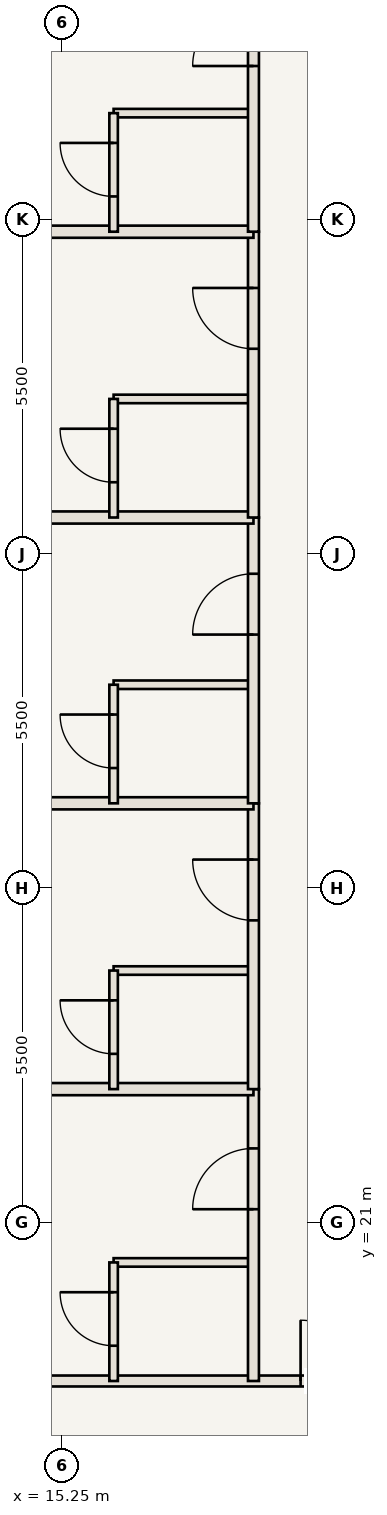
"""IFC4 building model, lengths in metres.
Left out: names, types, materials, properties, quantities, classifications, styles, units other than length and angle.
Written with IfcOpenShell. Run it as: python <this file> out.ifc"""

import sys

from ifc_helpers import new_model, si_unit, direction, frame, frame_2d, origin, place, context, subcontext, project, spatial, rectangle, extrude, element, fill, save


model = new_model("IFC4")
c1 = context("Model", 3, precision=1e-05, world=origin(), true_north=direction((0.0, 1.0)))
c2 = subcontext(c1, "Body", "Model", "MODEL_VIEW")
j1 = project(units=[si_unit("LENGTHUNIT", "METRE"), si_unit("PLANEANGLEUNIT", "RADIAN")], contexts=[c1])
p1 = place(None, origin())
s1 = spatial("IfcSite", under=j1, at=p1, CompositionType="ELEMENT")
p2 = place(p1, origin())
s2 = spatial("IfcBuilding", under=s1, at=p2, CompositionType="ELEMENT")
p3 = place(p2, frame((0.0, 0.0, 42.35)))
s3 = spatial("IfcBuildingStorey", under=s2, at=p3, CompositionType="ELEMENT", Elevation=42.35)
p4 = place(p3, frame((7.5, 18.4, 0.0), z_axis=(0.0, 0.0, 1.0), x_axis=(1.0, 0.0, 0.0)))
e1 = element("IfcWall", 1, at=p4, inside=s3, PredefinedType="STANDARD", context=c2, shape_type="SweptSolid", body=[
    extrude(rectangle(XDim=16.3, YDim=0.18, at=frame_2d((8.15, 0.0))), origin(), (0.0, 0.0, 1.0), 3.32),
])
p5 = place(p4, frame((11.675, 0.0, 0.0)))
e2 = element("IfcOpeningElement", 2, at=p5, cuts=e1, PredefinedType="OPENING", context=c2, shape_type="SweptSolid", body=[
    extrude(rectangle(XDim=1.0, YDim=2.15, at=frame_2d((0.5, 1.075))), frame((0.0, 0.1, 0.0), z_axis=(0.0, -1.0, 0.0), x_axis=(1.0, 0.0, 0.0)), (0.0, 0.0, 1.0), 0.2),
])
p6 = place(p3, frame((16.1, 20.35, 0.0), z_axis=(0.0, 0.0, 1.0), x_axis=(1.0, 0.0, 0.0)))
e3 = element("IfcWall", 3, at=p6, inside=s3, PredefinedType="STANDARD", context=c2, shape_type="SweptSolid", body=[
    extrude(rectangle(XDim=2.3, YDim=0.14, at=frame_2d((1.15, 0.0))), origin(), (0.0, 0.0, 1.0), 3.32),
])
p7 = place(p3, frame((16.1, 18.4, 0.0), z_axis=(0.0, 0.0, 1.0), x_axis=(0.0, 1.0, 0.0)))
e4 = element("IfcWall", 4, at=p7, inside=s3, PredefinedType="STANDARD", context=c2, shape_type="SweptSolid", body=[
    extrude(rectangle(XDim=1.95, YDim=0.14, at=frame_2d((0.975, 0.0))), origin(), (0.0, 0.0, 1.0), 3.32),
])
p8 = place(p7, frame((0.58, 0.0, 0.0)))
e5 = element("IfcOpeningElement", 5, at=p8, cuts=e4, PredefinedType="OPENING", context=c2, shape_type="SweptSolid", body=[
    extrude(rectangle(XDim=0.88, YDim=2.1, at=frame_2d((0.44, 1.05))), frame((0.0, 0.08, 0.0), z_axis=(0.0, -1.0, 0.0), x_axis=(1.0, 0.0, 0.0)), (0.0, 0.0, 1.0), 0.16),
])
p9 = place(p3, frame((18.4, 18.4, 0.0), z_axis=(0.0, 0.0, 1.0), x_axis=(0.0, 1.0, 0.0)))
e6 = element("IfcWall", 6, at=p9, inside=s3, PredefinedType="STANDARD", context=c2, shape_type="SweptSolid", body=[
    extrude(rectangle(XDim=4.8, YDim=0.18, at=frame_2d((2.4, 0.0))), origin(), (0.0, 0.0, 1.0), 3.32),
])
p10 = place(p9, frame((2.825, 0.0, 0.0)))
e7 = element("IfcOpeningElement", 7, at=p10, cuts=e6, PredefinedType="OPENING", context=c2, shape_type="SweptSolid", body=[
    extrude(rectangle(XDim=1.0, YDim=2.15, at=frame_2d((0.5, 1.075))), frame((0.0, 0.1, 0.0), z_axis=(0.0, -1.0, 0.0), x_axis=(1.0, 0.0, 0.0)), (0.0, 0.0, 1.0), 0.2),
])
p11 = place(p3, frame((4.06, 23.2, 0.0), z_axis=(0.0, 0.0, 1.0), x_axis=(1.0, 0.0, 0.0)))
e8 = element("IfcWall", 8, at=p11, inside=s3, PredefinedType="STANDARD", context=c2, shape_type="SweptSolid", body=[
    extrude(rectangle(XDim=14.34, YDim=0.2, at=frame_2d((7.17, 0.0))), origin(), (0.0, 0.0, 1.0), 3.32),
])
p12 = place(p3, frame((16.1, 25.15, 0.0), z_axis=(0.0, 0.0, 1.0), x_axis=(1.0, 0.0, 0.0)))
e9 = element("IfcWall", 9, at=p12, inside=s3, PredefinedType="STANDARD", context=c2, shape_type="SweptSolid", body=[
    extrude(rectangle(XDim=2.3, YDim=0.14, at=frame_2d((1.15, 0.0))), origin(), (0.0, 0.0, 1.0), 3.32),
])
p13 = place(p3, frame((16.1, 23.2, 0.0), z_axis=(0.0, 0.0, 1.0), x_axis=(0.0, 1.0, 0.0)))
e10 = element("IfcWall", 10, at=p13, inside=s3, PredefinedType="STANDARD", context=c2, shape_type="SweptSolid", body=[
    extrude(rectangle(XDim=1.95, YDim=0.14, at=frame_2d((0.975, 0.0))), origin(), (0.0, 0.0, 1.0), 3.32),
])
p14 = place(p13, frame((0.58, 0.0, 0.0)))
e11 = element("IfcOpeningElement", 11, at=p14, cuts=e10, PredefinedType="OPENING", context=c2, shape_type="SweptSolid", body=[
    extrude(rectangle(XDim=0.88, YDim=2.1, at=frame_2d((0.44, 1.05))), frame((0.0, 0.08, 0.0), z_axis=(0.0, -1.0, 0.0), x_axis=(1.0, 0.0, 0.0)), (0.0, 0.0, 1.0), 0.16),
])
p15 = place(p3, frame((18.4, 23.2, 0.0), z_axis=(0.0, 0.0, 1.0), x_axis=(0.0, 1.0, 0.0)))
e12 = element("IfcWall", 12, at=p15, inside=s3, PredefinedType="STANDARD", context=c2, shape_type="SweptSolid", body=[
    extrude(rectangle(XDim=4.7, YDim=0.18, at=frame_2d((2.35, 0.0))), origin(), (0.0, 0.0, 1.0), 3.32),
])
p16 = place(p15, frame((2.775, 0.0, 0.0)))
e13 = element("IfcOpeningElement", 13, at=p16, cuts=e12, PredefinedType="OPENING", context=c2, shape_type="SweptSolid", body=[
    extrude(rectangle(XDim=1.0, YDim=2.15, at=frame_2d((0.5, 1.075))), frame((0.0, 0.1, 0.0), z_axis=(0.0, -1.0, 0.0), x_axis=(1.0, 0.0, 0.0)), (0.0, 0.0, 1.0), 0.2),
])
p17 = place(p3, frame((4.06, 27.9, 0.0), z_axis=(0.0, 0.0, 1.0), x_axis=(1.0, 0.0, 0.0)))
e14 = element("IfcWall", 14, at=p17, inside=s3, PredefinedType="STANDARD", context=c2, shape_type="SweptSolid", body=[
    extrude(rectangle(XDim=14.34, YDim=0.2, at=frame_2d((7.17, 0.0))), origin(), (0.0, 0.0, 1.0), 3.32),
])
p18 = place(p3, frame((16.1, 29.85, 0.0), z_axis=(0.0, 0.0, 1.0), x_axis=(1.0, 0.0, 0.0)))
e15 = element("IfcWall", 15, at=p18, inside=s3, PredefinedType="STANDARD", context=c2, shape_type="SweptSolid", body=[
    extrude(rectangle(XDim=2.3, YDim=0.14, at=frame_2d((1.15, 0.0))), origin(), (0.0, 0.0, 1.0), 3.32),
])
p19 = place(p3, frame((16.1, 27.9, 0.0), z_axis=(0.0, 0.0, 1.0), x_axis=(0.0, 1.0, 0.0)))
e16 = element("IfcWall", 16, at=p19, inside=s3, PredefinedType="STANDARD", context=c2, shape_type="SweptSolid", body=[
    extrude(rectangle(XDim=1.95, YDim=0.14, at=frame_2d((0.975, 0.0))), origin(), (0.0, 0.0, 1.0), 3.32),
])
p20 = place(p19, frame((0.58, 0.0, 0.0)))
e17 = element("IfcOpeningElement", 17, at=p20, cuts=e16, PredefinedType="OPENING", context=c2, shape_type="SweptSolid", body=[
    extrude(rectangle(XDim=0.88, YDim=2.1, at=frame_2d((0.44, 1.05))), frame((0.0, 0.08, 0.0), z_axis=(0.0, -1.0, 0.0), x_axis=(1.0, 0.0, 0.0)), (0.0, 0.0, 1.0), 0.16),
])
p21 = place(p3, frame((18.4, 27.9, 0.0), z_axis=(0.0, 0.0, 1.0), x_axis=(0.0, 1.0, 0.0)))
e18 = element("IfcWall", 18, at=p21, inside=s3, PredefinedType="STANDARD", context=c2, shape_type="SweptSolid", body=[
    extrude(rectangle(XDim=4.7, YDim=0.18, at=frame_2d((2.35, 0.0))), origin(), (0.0, 0.0, 1.0), 3.32),
])
p22 = place(p21, frame((2.775, 0.0, 0.0)))
e19 = element("IfcOpeningElement", 19, at=p22, cuts=e18, PredefinedType="OPENING", context=c2, shape_type="SweptSolid", body=[
    extrude(rectangle(XDim=1.0, YDim=2.15, at=frame_2d((0.5, 1.075))), frame((0.0, 0.1, 0.0), z_axis=(0.0, -1.0, 0.0), x_axis=(1.0, 0.0, 0.0)), (0.0, 0.0, 1.0), 0.2),
])
p23 = place(p3, frame((4.06, 32.6, 0.0), z_axis=(0.0, 0.0, 1.0), x_axis=(1.0, 0.0, 0.0)))
e20 = element("IfcWall", 20, at=p23, inside=s3, PredefinedType="STANDARD", context=c2, shape_type="SweptSolid", body=[
    extrude(rectangle(XDim=14.34, YDim=0.2, at=frame_2d((7.17, 0.0))), origin(), (0.0, 0.0, 1.0), 3.32),
])
p24 = place(p3, frame((16.1, 34.55, 0.0), z_axis=(0.0, 0.0, 1.0), x_axis=(1.0, 0.0, 0.0)))
e21 = element("IfcWall", 21, at=p24, inside=s3, PredefinedType="STANDARD", context=c2, shape_type="SweptSolid", body=[
    extrude(rectangle(XDim=2.3, YDim=0.14, at=frame_2d((1.15, 0.0))), origin(), (0.0, 0.0, 1.0), 3.32),
])
p25 = place(p3, frame((16.1, 32.6, 0.0), z_axis=(0.0, 0.0, 1.0), x_axis=(0.0, 1.0, 0.0)))
e22 = element("IfcWall", 22, at=p25, inside=s3, PredefinedType="STANDARD", context=c2, shape_type="SweptSolid", body=[
    extrude(rectangle(XDim=1.95, YDim=0.14, at=frame_2d((0.975, 0.0))), origin(), (0.0, 0.0, 1.0), 3.32),
])
p26 = place(p25, frame((0.58, 0.0, 0.0)))
e23 = element("IfcOpeningElement", 23, at=p26, cuts=e22, PredefinedType="OPENING", context=c2, shape_type="SweptSolid", body=[
    extrude(rectangle(XDim=0.88, YDim=2.1, at=frame_2d((0.44, 1.05))), frame((0.0, 0.08, 0.0), z_axis=(0.0, -1.0, 0.0), x_axis=(1.0, 0.0, 0.0)), (0.0, 0.0, 1.0), 0.16),
])
p27 = place(p3, frame((18.4, 32.6, 0.0), z_axis=(0.0, 0.0, 1.0), x_axis=(0.0, 1.0, 0.0)))
e24 = element("IfcWall", 24, at=p27, inside=s3, PredefinedType="STANDARD", context=c2, shape_type="SweptSolid", body=[
    extrude(rectangle(XDim=4.7, YDim=0.18, at=frame_2d((2.35, 0.0))), origin(), (0.0, 0.0, 1.0), 3.32),
])
p28 = place(p27, frame((2.775, 0.0, 0.0)))
e25 = element("IfcOpeningElement", 25, at=p28, cuts=e24, PredefinedType="OPENING", context=c2, shape_type="SweptSolid", body=[
    extrude(rectangle(XDim=1.0, YDim=2.15, at=frame_2d((0.5, 1.075))), frame((0.0, 0.1, 0.0), z_axis=(0.0, -1.0, 0.0), x_axis=(1.0, 0.0, 0.0)), (0.0, 0.0, 1.0), 0.2),
])
p29 = place(p3, frame((4.06, 37.3, 0.0), z_axis=(0.0, 0.0, 1.0), x_axis=(1.0, 0.0, 0.0)))
e26 = element("IfcWall", 26, at=p29, inside=s3, PredefinedType="STANDARD", context=c2, shape_type="SweptSolid", body=[
    extrude(rectangle(XDim=14.34, YDim=0.2, at=frame_2d((7.17, 0.0))), origin(), (0.0, 0.0, 1.0), 3.32),
])
p30 = place(p3, frame((16.1, 39.25, 0.0), z_axis=(0.0, 0.0, 1.0), x_axis=(1.0, 0.0, 0.0)))
e27 = element("IfcWall", 27, at=p30, inside=s3, PredefinedType="STANDARD", context=c2, shape_type="SweptSolid", body=[
    extrude(rectangle(XDim=2.3, YDim=0.14, at=frame_2d((1.15, 0.0))), origin(), (0.0, 0.0, 1.0), 3.32),
])
p31 = place(p3, frame((16.1, 37.3, 0.0), z_axis=(0.0, 0.0, 1.0), x_axis=(0.0, 1.0, 0.0)))
e28 = element("IfcWall", 28, at=p31, inside=s3, PredefinedType="STANDARD", context=c2, shape_type="SweptSolid", body=[
    extrude(rectangle(XDim=1.95, YDim=0.14, at=frame_2d((0.975, 0.0))), origin(), (0.0, 0.0, 1.0), 3.32),
])
p32 = place(p31, frame((0.58, 0.0, 0.0)))
e29 = element("IfcOpeningElement", 29, at=p32, cuts=e28, PredefinedType="OPENING", context=c2, shape_type="SweptSolid", body=[
    extrude(rectangle(XDim=0.88, YDim=2.1, at=frame_2d((0.44, 1.05))), frame((0.0, 0.08, 0.0), z_axis=(0.0, -1.0, 0.0), x_axis=(1.0, 0.0, 0.0)), (0.0, 0.0, 1.0), 0.16),
])
p33 = place(p3, frame((18.4, 37.3, 0.0), z_axis=(0.0, 0.0, 1.0), x_axis=(0.0, 1.0, 0.0)))
e30 = element("IfcWall", 30, at=p33, inside=s3, PredefinedType="STANDARD", context=c2, shape_type="SweptSolid", body=[
    extrude(rectangle(XDim=4.6, YDim=0.18, at=frame_2d((2.3, 0.0))), origin(), (0.0, 0.0, 1.0), 3.32),
])
p34 = place(p33, frame((2.725, 0.0, 0.0)))
e31 = element("IfcOpeningElement", 31, at=p34, cuts=e30, PredefinedType="OPENING", context=c2, shape_type="SweptSolid", body=[
    extrude(rectangle(XDim=1.0, YDim=2.15, at=frame_2d((0.5, 1.075))), frame((0.0, 0.1, 0.0), z_axis=(0.0, -1.0, 0.0), x_axis=(1.0, 0.0, 0.0)), (0.0, 0.0, 1.0), 0.2),
])
p35 = place(p5, origin())
e32 = element("IfcDoor", 32, at=p35, inside=s3, OperationType="SINGLE_SWING_LEFT", PredefinedType="DOOR", context=c2, shape_type="SweptSolid", body=[
    extrude(rectangle(XDim=1.0, YDim=2.15, at=frame_2d((0.5, 1.075))), frame((0.0, 0.025, 0.0), z_axis=(0.0, -1.0, 0.0), x_axis=(1.0, 0.0, 0.0)), (0.0, 0.0, 1.0), 0.05),
])
fill(e2, e32)
p36 = place(p8, origin())
e33 = element("IfcDoor", 33, at=p36, inside=s3, OperationType="SINGLE_SWING_RIGHT", PredefinedType="DOOR", context=c2, shape_type="SweptSolid", body=[
    extrude(rectangle(XDim=0.88, YDim=2.1, at=frame_2d((0.44, 1.05))), frame((0.0, 0.025, 0.0), z_axis=(0.0, -1.0, 0.0), x_axis=(1.0, 0.0, 0.0)), (0.0, 0.0, 1.0), 0.05),
])
fill(e5, e33)
p37 = place(p10, origin())
e34 = element("IfcDoor", 34, at=p37, inside=s3, OperationType="SINGLE_SWING_LEFT", PredefinedType="DOOR", context=c2, shape_type="SweptSolid", body=[
    extrude(rectangle(XDim=1.0, YDim=2.15, at=frame_2d((0.5, 1.075))), frame((0.0, 0.025, 0.0), z_axis=(0.0, -1.0, 0.0), x_axis=(1.0, 0.0, 0.0)), (0.0, 0.0, 1.0), 0.05),
])
fill(e7, e34)
p38 = place(p14, origin())
e35 = element("IfcDoor", 35, at=p38, inside=s3, OperationType="SINGLE_SWING_RIGHT", PredefinedType="DOOR", context=c2, shape_type="SweptSolid", body=[
    extrude(rectangle(XDim=0.88, YDim=2.1, at=frame_2d((0.44, 1.05))), frame((0.0, 0.025, 0.0), z_axis=(0.0, -1.0, 0.0), x_axis=(1.0, 0.0, 0.0)), (0.0, 0.0, 1.0), 0.05),
])
fill(e11, e35)
p39 = place(p16, origin())
e36 = element("IfcDoor", 36, at=p39, inside=s3, OperationType="SINGLE_SWING_RIGHT", PredefinedType="DOOR", context=c2, shape_type="SweptSolid", body=[
    extrude(rectangle(XDim=1.0, YDim=2.15, at=frame_2d((0.5, 1.075))), frame((0.0, 0.025, 0.0), z_axis=(0.0, -1.0, 0.0), x_axis=(1.0, 0.0, 0.0)), (0.0, 0.0, 1.0), 0.05),
])
fill(e13, e36)
p40 = place(p20, origin())
e37 = element("IfcDoor", 37, at=p40, inside=s3, OperationType="SINGLE_SWING_RIGHT", PredefinedType="DOOR", context=c2, shape_type="SweptSolid", body=[
    extrude(rectangle(XDim=0.88, YDim=2.1, at=frame_2d((0.44, 1.05))), frame((0.0, 0.025, 0.0), z_axis=(0.0, -1.0, 0.0), x_axis=(1.0, 0.0, 0.0)), (0.0, 0.0, 1.0), 0.05),
])
fill(e17, e37)
p41 = place(p22, origin())
e38 = element("IfcDoor", 38, at=p41, inside=s3, OperationType="SINGLE_SWING_LEFT", PredefinedType="DOOR", context=c2, shape_type="SweptSolid", body=[
    extrude(rectangle(XDim=1.0, YDim=2.15, at=frame_2d((0.5, 1.075))), frame((0.0, 0.025, 0.0), z_axis=(0.0, -1.0, 0.0), x_axis=(1.0, 0.0, 0.0)), (0.0, 0.0, 1.0), 0.05),
])
fill(e19, e38)
p42 = place(p26, origin())
e39 = element("IfcDoor", 39, at=p42, inside=s3, OperationType="SINGLE_SWING_RIGHT", PredefinedType="DOOR", context=c2, shape_type="SweptSolid", body=[
    extrude(rectangle(XDim=0.88, YDim=2.1, at=frame_2d((0.44, 1.05))), frame((0.0, 0.025, 0.0), z_axis=(0.0, -1.0, 0.0), x_axis=(1.0, 0.0, 0.0)), (0.0, 0.0, 1.0), 0.05),
])
fill(e23, e39)
p43 = place(p28, origin())
e40 = element("IfcDoor", 40, at=p43, inside=s3, OperationType="SINGLE_SWING_RIGHT", PredefinedType="DOOR", context=c2, shape_type="SweptSolid", body=[
    extrude(rectangle(XDim=1.0, YDim=2.15, at=frame_2d((0.5, 1.075))), frame((0.0, 0.025, 0.0), z_axis=(0.0, -1.0, 0.0), x_axis=(1.0, 0.0, 0.0)), (0.0, 0.0, 1.0), 0.05),
])
fill(e25, e40)
p44 = place(p32, origin())
e41 = element("IfcDoor", 41, at=p44, inside=s3, OperationType="SINGLE_SWING_RIGHT", PredefinedType="DOOR", context=c2, shape_type="SweptSolid", body=[
    extrude(rectangle(XDim=0.88, YDim=2.1, at=frame_2d((0.44, 1.05))), frame((0.0, 0.025, 0.0), z_axis=(0.0, -1.0, 0.0), x_axis=(1.0, 0.0, 0.0)), (0.0, 0.0, 1.0), 0.05),
])
fill(e29, e41)
p45 = place(p34, origin())
e42 = element("IfcDoor", 42, at=p45, inside=s3, OperationType="SINGLE_SWING_LEFT", PredefinedType="DOOR", context=c2, shape_type="SweptSolid", body=[
    extrude(rectangle(XDim=1.0, YDim=2.15, at=frame_2d((0.5, 1.075))), frame((0.0, 0.025, 0.0), z_axis=(0.0, -1.0, 0.0), x_axis=(1.0, 0.0, 0.0)), (0.0, 0.0, 1.0), 0.05),
])
fill(e31, e42)
save(model, sys.argv[1])
